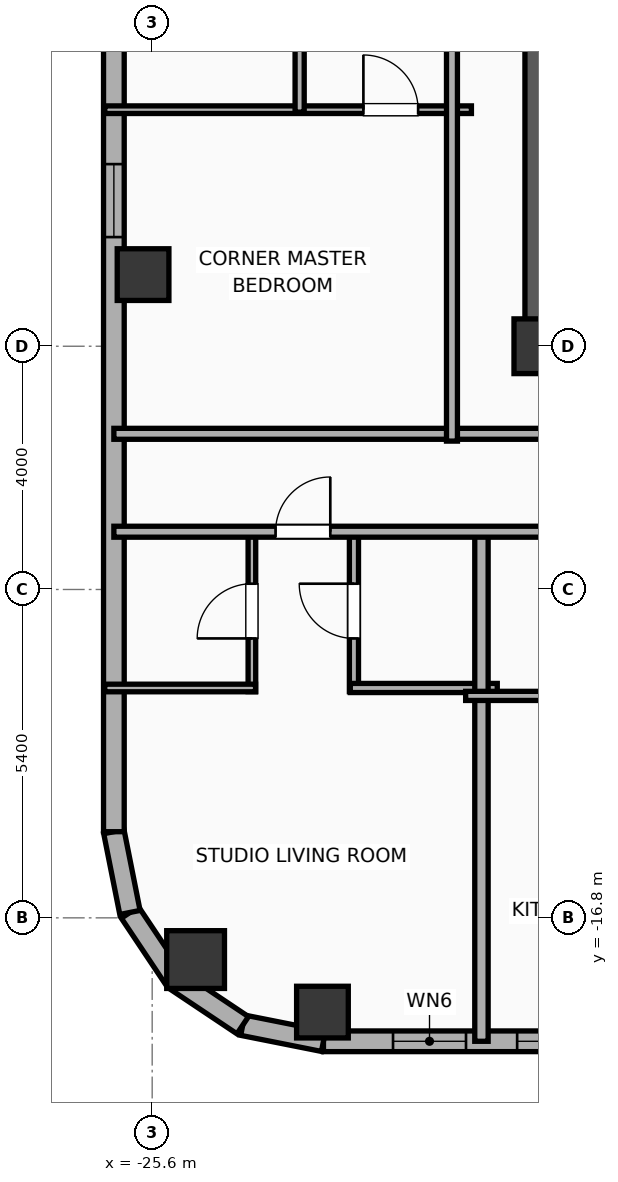
"""IFC4 building model, lengths in metres.
Left out: names, types, materials, properties, quantities, classifications, styles, units other than length and angle.
Written with IfcOpenShell. Run it as: python <this file> out.ifc"""

import sys

from ifc_helpers import new_model, si_unit, direction, frame, frame_2d, origin, origin_2d, place, context, subcontext, project, spatial, rectangle, hollow_rectangle, hollow_circle, extrude, element, fill, save


model = new_model("IFC4")
c1 = context("Model", 3, precision=1e-05, world=origin(), true_north=direction((0.0, 1.0)))
c2 = subcontext(c1, "Body", "Model", "MODEL_VIEW")
j1 = project(units=[si_unit("LENGTHUNIT", "METRE"), si_unit("PLANEANGLEUNIT", "RADIAN")], contexts=[c1])
p1 = place(None, origin())
s1 = spatial("IfcSite", under=j1, at=p1, CompositionType="ELEMENT")
p2 = place(p1, origin())
s2 = spatial("IfcBuilding", under=s1, at=p2, CompositionType="ELEMENT")
p3 = place(p2, frame((0.0, 0.0, 227.5)))
s3 = spatial("IfcBuildingStorey", under=s2, at=p3, CompositionType="ELEMENT", Elevation=227.5)
p4 = place(p3, frame((-19.2, -7.4, 0.0), z_axis=(0.0, 0.0, 1.0), x_axis=(1.0, 0.0, 0.0)))
e1 = element("IfcColumn", 1, at=p4, inside=s3, PredefinedType="COLUMN", context=c2, shape_type="SweptSolid", body=[
    extrude(rectangle(XDim=0.9, YDim=0.9, at=origin_2d()), origin(), (0.0, 0.0, 1.0), 3.9),
])
p5 = place(p3, frame((-19.425, -7.4, 0.0), z_axis=(0.0, 0.0, 1.0), x_axis=(1.0, 0.0, 0.0)))
e2 = element("IfcWall", 2, at=p5, inside=s3, PredefinedType="SHEAR", context=c2, shape_type="SweptSolid", body=[
    extrude(rectangle(XDim=7.25, YDim=0.45, at=frame_2d((3.625, 0.0))), origin(), (0.0, 0.0, 1.0), 3.65),
])
p6 = place(p3, frame((-19.145, -7.4, 0.0), z_axis=(0.0, 0.0, 1.0), x_axis=(0.0, 1.0, 0.0)))
e3 = element("IfcWall", 3, at=p6, inside=s3, PredefinedType="SHEAR", context=c2, shape_type="SweptSolid", body=[
    extrude(rectangle(XDim=14.8, YDim=0.65, at=frame_2d((7.4, 0.0))), origin(), (0.0, 0.0, 1.0), 3.65),
])
for number, where, z_axis, x_axis in (
    (4, (-22.8, -18.35, 0.0), (0.0, 0.0, 1.0), (1.0, 0.0, 0.0)),
    (5, (-25.75, -6.222, 0.0), (0.0, 0.0, 1.0), (1.0, 0.0, 0.0)),
):
    element("IfcColumn", number, at=place(p3, frame(where, z_axis=z_axis, x_axis=x_axis)), inside=s3, PredefinedType="COLUMN", context=c2, shape_type="SweptSolid", body=[
        extrude(hollow_rectangle(XDim=0.85, YDim=0.85, WallThickness=0.028, at=origin_2d()), origin(), (0.0, 0.0, 1.0), 3.9),
    ])
p7 = place(p3, frame((-24.886, -17.486, 0.0), z_axis=(0.0, 0.0, 1.0), x_axis=(1.0, 0.0, 0.0)))
e6 = element("IfcColumn", 6, at=p7, inside=s3, PredefinedType="COLUMN", context=c2, shape_type="SweptSolid", body=[
    extrude(hollow_circle(Radius=0.475, WallThickness=0.032, at=origin_2d()), origin(), (0.0, 0.0, 1.0), 3.9),
])
p8 = place(p3, frame((26.783, -18.83, 0.0), z_axis=(0.0, 0.0, 1.0), x_axis=(-1.0, 0.0, 0.0)))
e7 = element("IfcWall", 7, at=p8, inside=s3, PredefinedType="ELEMENTEDWALL", context=c2, shape_type="SweptSolid", body=[
    extrude(rectangle(XDim=49.566, YDim=0.34, at=frame_2d((24.783, 0.0))), origin(), (0.0, 0.0, 1.0), 3.65),
])
p9 = place(p8, frame((23.583, 0.0, 0.75)))
e8 = element("IfcOpeningElement", 8, at=p9, cuts=e7, PredefinedType="OPENING", context=c2, shape_type="SweptSolid", body=[
    extrude(rectangle(XDim=2.4, YDim=2.1, at=frame_2d((1.2, 1.05))), frame((0.0, 0.18, 0.0), z_axis=(0.0, -1.0, 0.0), x_axis=(1.0, 0.0, 0.0)), (0.0, 0.0, 1.0), 0.36),
])
p10 = place(p8, frame((41.756, 0.0, 0.75)))
e9 = element("IfcOpeningElement", 9, at=p10, cuts=e7, PredefinedType="OPENING", context=c2, shape_type="SweptSolid", body=[
    extrude(rectangle(XDim=2.4, YDim=2.1, at=frame_2d((1.2, 1.05))), frame((0.0, 0.18, 0.0), z_axis=(0.0, -1.0, 0.0), x_axis=(1.0, 0.0, 0.0)), (0.0, 0.0, 1.0), 0.36),
])
p11 = place(p8, frame((47.222, 0.0, 0.75)))
e10 = element("IfcOpeningElement", 10, at=p11, cuts=e7, PredefinedType="OPENING", context=c2, shape_type="SweptSolid", body=[
    extrude(rectangle(XDim=1.2, YDim=2.05, at=frame_2d((0.6, 1.025))), frame((0.0, 0.18, 0.0), z_axis=(0.0, -1.0, 0.0), x_axis=(1.0, 0.0, 0.0)), (0.0, 0.0, 1.0), 0.36),
])
p12 = place(p8, frame((45.181, 0.0, 0.75)))
e11 = element("IfcOpeningElement", 11, at=p12, cuts=e7, PredefinedType="OPENING", context=c2, shape_type="SweptSolid", body=[
    extrude(rectangle(XDim=1.2, YDim=2.05, at=frame_2d((0.6, 1.025))), frame((0.0, 0.18, 0.0), z_axis=(0.0, -1.0, 0.0), x_axis=(1.0, 0.0, 0.0)), (0.0, 0.0, 1.0), 0.36),
])
p13 = place(p8, frame((37.289, 0.0, 0.75)))
e12 = element("IfcOpeningElement", 12, at=p13, cuts=e7, PredefinedType="OPENING", context=c2, shape_type="SweptSolid", body=[
    extrude(rectangle(XDim=1.2, YDim=2.05, at=frame_2d((0.6, 1.025))), frame((0.0, 0.18, 0.0), z_axis=(0.0, -1.0, 0.0), x_axis=(1.0, 0.0, 0.0)), (0.0, 0.0, 1.0), 0.36),
])
p14 = place(p8, frame((16.115, 0.0, 0.75)))
e13 = element("IfcOpeningElement", 13, at=p14, cuts=e7, PredefinedType="OPENING", context=c2, shape_type="SweptSolid", body=[
    extrude(rectangle(XDim=1.2, YDim=2.05, at=frame_2d((0.6, 1.025))), frame((0.0, 0.18, 0.0), z_axis=(0.0, -1.0, 0.0), x_axis=(1.0, 0.0, 0.0)), (0.0, 0.0, 1.0), 0.36),
])
p15 = place(p8, frame((12.422, 0.0, 0.75)))
e14 = element("IfcOpeningElement", 14, at=p15, cuts=e7, PredefinedType="OPENING", context=c2, shape_type="SweptSolid", body=[
    extrude(rectangle(XDim=1.2, YDim=2.05, at=frame_2d((0.6, 1.025))), frame((0.0, 0.18, 0.0), z_axis=(0.0, -1.0, 0.0), x_axis=(1.0, 0.0, 0.0)), (0.0, 0.0, 1.0), 0.36),
])
p16 = place(p8, frame((8.09, 0.0, 0.75)))
e15 = element("IfcOpeningElement", 15, at=p16, cuts=e7, PredefinedType="OPENING", context=c2, shape_type="SweptSolid", body=[
    extrude(rectangle(XDim=1.2, YDim=2.05, at=frame_2d((0.6, 1.025))), frame((0.0, 0.18, 0.0), z_axis=(0.0, -1.0, 0.0), x_axis=(1.0, 0.0, 0.0)), (0.0, 0.0, 1.0), 0.36),
])
p17 = place(p8, frame((4.637, 0.0, 0.75)))
e16 = element("IfcOpeningElement", 16, at=p17, cuts=e7, PredefinedType="OPENING", context=c2, shape_type="SweptSolid", body=[
    extrude(rectangle(XDim=1.2, YDim=2.05, at=frame_2d((0.6, 1.025))), frame((0.0, 0.18, 0.0), z_axis=(0.0, -1.0, 0.0), x_axis=(1.0, 0.0, 0.0)), (0.0, 0.0, 1.0), 0.36),
])
p18 = place(p8, frame((1.811, 0.0, 0.75)))
e17 = element("IfcOpeningElement", 17, at=p18, cuts=e7, PredefinedType="OPENING", context=c2, shape_type="SweptSolid", body=[
    extrude(rectangle(XDim=1.2, YDim=2.05, at=frame_2d((0.6, 1.025))), frame((0.0, 0.18, 0.0), z_axis=(0.0, -1.0, 0.0), x_axis=(1.0, 0.0, 0.0)), (0.0, 0.0, 1.0), 0.36),
])
p19 = place(p8, frame((32.253, 0.0, 0.75)))
e18 = element("IfcOpeningElement", 18, at=p19, cuts=e7, PredefinedType="OPENING", context=c2, shape_type="SweptSolid", body=[
    extrude(rectangle(XDim=1.2, YDim=2.05, at=frame_2d((0.6, 1.025))), frame((0.0, 0.18, 0.0), z_axis=(0.0, -1.0, 0.0), x_axis=(1.0, 0.0, 0.0)), (0.0, 0.0, 1.0), 0.36),
])
p20 = place(p8, frame((27.853, 0.0, 0.75)))
e19 = element("IfcOpeningElement", 19, at=p20, cuts=e7, PredefinedType="OPENING", context=c2, shape_type="SweptSolid", body=[
    extrude(rectangle(XDim=1.2, YDim=2.05, at=frame_2d((0.6, 1.025))), frame((0.0, 0.18, 0.0), z_axis=(0.0, -1.0, 0.0), x_axis=(1.0, 0.0, 0.0)), (0.0, 0.0, 1.0), 0.36),
])
p21 = place(p8, frame((20.473, 0.0, 0.75)))
e20 = element("IfcOpeningElement", 20, at=p21, cuts=e7, PredefinedType="OPENING", context=c2, shape_type="SweptSolid", body=[
    extrude(rectangle(XDim=1.2, YDim=2.05, at=frame_2d((0.6, 1.025))), frame((0.0, 0.18, 0.0), z_axis=(0.0, -1.0, 0.0), x_axis=(1.0, 0.0, 0.0)), (0.0, 0.0, 1.0), 0.36),
])
p22 = place(p3, frame((-22.783, -18.83, 0.0), z_axis=(0.0, 0.0, 1.0), x_axis=(-0.980788153188, 0.195075878998, 0.0)))
e21 = element("IfcWall", 21, at=p22, inside=s3, PredefinedType="ELEMENTEDWALL", context=c2, shape_type="SweptSolid", body=[
    extrude(rectangle(XDim=1.354, YDim=0.34, at=frame_2d((0.677, 0.0))), origin(), (0.0, 0.0, 1.0), 3.65),
])
p23 = place(p3, frame((-24.111, -18.566, 0.0), z_axis=(0.0, 0.0, 1.0), x_axis=(-0.831403586725, 0.555669034571, 0.0)))
e22 = element("IfcWall", 22, at=p23, inside=s3, PredefinedType="ELEMENTEDWALL", context=c2, shape_type="SweptSolid", body=[
    extrude(rectangle(XDim=1.337, YDim=0.34, at=frame_2d((0.668, 0.0))), origin(), (0.0, 0.0, 1.0), 3.65),
])
p24 = place(p3, frame((-25.223, -17.823, 0.0), z_axis=(0.0, 0.0, 1.0), x_axis=(-0.555584683399, 0.831459956686, 0.0)))
e23 = element("IfcWall", 23, at=p24, inside=s3, PredefinedType="ELEMENTEDWALL", context=c2, shape_type="SweptSolid", body=[
    extrude(rectangle(XDim=1.337, YDim=0.34, at=frame_2d((0.668, 0.0))), origin(), (0.0, 0.0, 1.0), 3.65),
])
p25 = place(p3, frame((-25.966, -16.711, 0.0), z_axis=(0.0, 0.0, 1.0), x_axis=(-0.195110379894, 0.98078129043, 0.0)))
e24 = element("IfcWall", 24, at=p25, inside=s3, PredefinedType="ELEMENTEDWALL", context=c2, shape_type="SweptSolid", body=[
    extrude(rectangle(XDim=1.354, YDim=0.34, at=frame_2d((0.677, 0.0))), origin(), (0.0, 0.0, 1.0), 3.65),
])
p26 = place(p3, frame((-26.23, -15.383, 0.0), z_axis=(0.0, 0.0, 1.0), x_axis=(0.0, 1.0, 0.0)))
e25 = element("IfcWall", 25, at=p26, inside=s3, PredefinedType="ELEMENTEDWALL", context=c2, shape_type="SweptSolid", body=[
    extrude(rectangle(XDim=31.967, YDim=0.34, at=frame_2d((15.983, 0.0))), origin(), (0.0, 0.0, 1.0), 3.65),
])
p27 = place(p26, frame((29.431, 0.0, 0.75)))
e26 = element("IfcOpeningElement", 26, at=p27, cuts=e25, PredefinedType="OPENING", context=c2, shape_type="SweptSolid", body=[
    extrude(rectangle(XDim=1.2, YDim=2.05, at=frame_2d((0.6, 1.025))), frame((0.0, 0.18, 0.0), z_axis=(0.0, -1.0, 0.0), x_axis=(1.0, 0.0, 0.0)), (0.0, 0.0, 1.0), 0.36),
])
p28 = place(p26, frame((20.603, 0.0, 0.75)))
e27 = element("IfcOpeningElement", 27, at=p28, cuts=e25, PredefinedType="OPENING", context=c2, shape_type="SweptSolid", body=[
    extrude(rectangle(XDim=1.2, YDim=2.05, at=frame_2d((0.6, 1.025))), frame((0.0, 0.18, 0.0), z_axis=(0.0, -1.0, 0.0), x_axis=(1.0, 0.0, 0.0)), (0.0, 0.0, 1.0), 0.36),
])
p29 = place(p26, frame((9.778, 0.0, 0.75)))
e28 = element("IfcOpeningElement", 28, at=p29, cuts=e25, PredefinedType="OPENING", context=c2, shape_type="SweptSolid", body=[
    extrude(rectangle(XDim=1.2, YDim=2.05, at=frame_2d((0.6, 1.025))), frame((0.0, 0.18, 0.0), z_axis=(0.0, -1.0, 0.0), x_axis=(1.0, 0.0, 0.0)), (0.0, 0.0, 1.0), 0.36),
])
p30 = place(p3, frame((-26.23, -8.84, 0.0), z_axis=(0.0, 0.0, 1.0), x_axis=(1.0, 0.0, 0.0)))
e29 = element("IfcWall", 29, at=p30, inside=s3, PredefinedType="PARTITIONING", context=c2, shape_type="SweptSolid", body=[
    extrude(rectangle(XDim=16.35, YDim=0.18, at=frame_2d((8.175, 0.0))), origin(), (0.0, 0.0, 1.0), 3.65),
])
p31 = place(p3, frame((-23.96, -13.08, 0.0), z_axis=(0.0, 0.0, 1.0), x_axis=(0.0, 1.0, 0.0)))
e30 = element("IfcWall", 30, at=p31, inside=s3, PredefinedType="PARTITIONING", context=c2, shape_type="SweptSolid", body=[
    extrude(rectangle(XDim=2.65, YDim=0.125, at=frame_2d((1.325, 0.0))), origin(), (0.0, 0.0, 1.0), 3.65),
])
p32 = place(p31, frame((0.875, 0.0, 0.0)))
e31 = element("IfcOpeningElement", 31, at=p32, cuts=e30, PredefinedType="OPENING", context=c2, shape_type="SweptSolid", body=[
    extrude(rectangle(XDim=0.9, YDim=2.05, at=frame_2d((0.45, 1.025))), frame((0.0, 0.073, 0.0), z_axis=(0.0, -1.0, 0.0), x_axis=(1.0, 0.0, 0.0)), (0.0, 0.0, 1.0), 0.145),
])
p33 = place(p3, frame((-22.282, -13.08, 0.0), z_axis=(0.0, 0.0, 1.0), x_axis=(0.0, 1.0, 0.0)))
e32 = element("IfcWall", 32, at=p33, inside=s3, PredefinedType="PLUMBINGWALL", context=c2, shape_type="SweptSolid", body=[
    extrude(rectangle(XDim=2.65, YDim=0.15, at=frame_2d((1.325, 0.0))), origin(), (0.0, 0.0, 1.0), 3.65),
])
p34 = place(p33, frame((0.875, 0.0, 0.0)))
e33 = element("IfcOpeningElement", 33, at=p34, cuts=e32, PredefinedType="OPENING", context=c2, shape_type="SweptSolid", body=[
    extrude(rectangle(XDim=0.9, YDim=2.05, at=frame_2d((0.45, 1.025))), frame((0.0, 0.085, 0.0), z_axis=(0.0, -1.0, 0.0), x_axis=(1.0, 0.0, 0.0)), (0.0, 0.0, 1.0), 0.17),
])
p35 = place(p3, frame((-26.38, -13.02, 0.0), z_axis=(0.0, 0.0, 1.0), x_axis=(1.0, 0.0, 0.0)))
e34 = element("IfcWall", 34, at=p35, inside=s3, PredefinedType="PARTITIONING", context=c2, shape_type="SweptSolid", body=[
    extrude(rectangle(XDim=2.48, YDim=0.125, at=frame_2d((1.24, 0.0))), origin(), (0.0, 0.0, 1.0), 3.65),
])
p36 = place(p3, frame((-22.342, -13.02, 0.0), z_axis=(0.0, 0.0, 1.0), x_axis=(1.0, 0.0, 0.0)))
e35 = element("IfcWall", 35, at=p36, inside=s3, PredefinedType="PLUMBINGWALL", context=c2, shape_type="SweptSolid", body=[
    extrude(rectangle(XDim=2.417, YDim=0.15, at=frame_2d((1.208, 0.0))), origin(), (0.0, 0.0, 1.0), 3.65),
])
p37 = place(p3, frame((-20.185, -18.83, 0.0), z_axis=(0.0, 0.0, 1.0), x_axis=(0.0, 1.0, 0.0)))
e36 = element("IfcWall", 36, at=p37, inside=s3, PredefinedType="PARTITIONING", context=c2, shape_type="SweptSolid", body=[
    extrude(rectangle(XDim=8.46, YDim=0.22, at=frame_2d((4.23, 0.0))), origin(), (0.0, 0.0, 1.0), 3.09),
])
p38 = place(p3, frame((-20.445, -13.15, 0.0), z_axis=(0.0, 0.0, 1.0), x_axis=(1.0, 0.0, 0.0)))
e37 = element("IfcWall", 37, at=p38, inside=s3, PredefinedType="PLUMBINGWALL", context=c2, shape_type="SweptSolid", body=[
    extrude(rectangle(XDim=2.714, YDim=0.15, at=frame_2d((1.357, 0.0))), origin(), (0.0, 0.0, 1.0), 3.65),
])
p39 = place(p3, frame((-26.23, -10.45, 0.0), z_axis=(0.0, 0.0, 1.0), x_axis=(1.0, 0.0, 0.0)))
e38 = element("IfcWall", 38, at=p39, inside=s3, PredefinedType="PARTITIONING", context=c2, shape_type="SweptSolid", body=[
    extrude(rectangle(XDim=18.15, YDim=0.18, at=frame_2d((9.075, 0.0))), origin(), (0.0, 0.0, 1.0), 3.65),
])
p40 = place(p39, frame((2.659, 0.0, 0.0)))
e39 = element("IfcOpeningElement", 39, at=p40, cuts=e38, PredefinedType="OPENING", context=c2, shape_type="SweptSolid", body=[
    extrude(rectangle(XDim=0.9, YDim=2.05, at=frame_2d((0.45, 1.025))), frame((0.0, 0.1, 0.0), z_axis=(0.0, -1.0, 0.0), x_axis=(1.0, 0.0, 0.0)), (0.0, 0.0, 1.0), 0.2),
])
p41 = place(p39, frame((9.654, 0.0, 0.0)))
e40 = element("IfcOpeningElement", 40, at=p41, cuts=e38, PredefinedType="OPENING", context=c2, shape_type="SweptSolid", body=[
    extrude(rectangle(XDim=1.15, YDim=2.05, at=frame_2d((0.575, 1.025))), frame((0.0, 0.1, 0.0), z_axis=(0.0, -1.0, 0.0), x_axis=(1.0, 0.0, 0.0)), (0.0, 0.0, 1.0), 0.2),
])
p42 = place(p39, frame((14.792, 0.0, 0.0)))
e41 = element("IfcOpeningElement", 41, at=p42, cuts=e38, PredefinedType="OPENING", context=c2, shape_type="SweptSolid", body=[
    extrude(rectangle(XDim=0.9, YDim=2.05, at=frame_2d((0.45, 1.025))), frame((0.0, 0.1, 0.0), z_axis=(0.0, -1.0, 0.0), x_axis=(1.0, 0.0, 0.0)), (0.0, 0.0, 1.0), 0.2),
])
p43 = place(p3, frame((-26.38, -3.51, 0.0), z_axis=(0.0, 0.0, 1.0), x_axis=(1.0, 0.0, 0.0)))
e42 = element("IfcWall", 42, at=p43, inside=s3, PredefinedType="PARTITIONING", context=c2, shape_type="SweptSolid", body=[
    extrude(rectangle(XDim=6.03, YDim=0.125, at=frame_2d((3.015, 0.0))), origin(), (0.0, 0.0, 1.0), 3.65),
])
p44 = place(p43, frame((4.253, 0.0, 0.0)))
e43 = element("IfcOpeningElement", 43, at=p44, cuts=e42, PredefinedType="OPENING", context=c2, shape_type="SweptSolid", body=[
    extrude(rectangle(XDim=0.9, YDim=2.05, at=frame_2d((0.45, 1.025))), frame((0.0, 0.073, 0.0), z_axis=(0.0, -1.0, 0.0), x_axis=(1.0, 0.0, 0.0)), (0.0, 0.0, 1.0), 0.145),
])
p45 = place(p3, frame((-23.175, -3.55, 0.0), z_axis=(0.0, 0.0, 1.0), x_axis=(0.0, 1.0, 0.0)))
e44 = element("IfcWall", 44, at=p45, inside=s3, PredefinedType="PLUMBINGWALL", context=c2, shape_type="SweptSolid", body=[
    extrude(rectangle(XDim=3.33, YDim=0.15, at=frame_2d((1.665, 0.0))), origin(), (0.0, 0.0, 1.0), 3.65),
])
p46 = place(p45, frame((1.215, 0.0, 0.0)))
e45 = element("IfcOpeningElement", 45, at=p46, cuts=e44, PredefinedType="OPENING", context=c2, shape_type="SweptSolid", body=[
    extrude(rectangle(XDim=0.9, YDim=2.05, at=frame_2d((0.45, 1.025))), frame((0.0, 0.085, 0.0), z_axis=(0.0, -1.0, 0.0), x_axis=(1.0, 0.0, 0.0)), (0.0, 0.0, 1.0), 0.17),
])
p47 = place(p3, frame((-20.67, -8.96, 0.0), z_axis=(0.0, 0.0, 1.0), x_axis=(0.0, 1.0, 0.0)))
e46 = element("IfcWall", 46, at=p47, inside=s3, PredefinedType="PARTITIONING", context=c2, shape_type="SweptSolid", body=[
    extrude(rectangle(XDim=17.92, YDim=0.18, at=frame_2d((8.96, 0.0))), origin(), (0.0, 0.0, 1.0), 3.65),
])
p48 = place(p11, origin())
e47 = element("IfcWindow", 47, at=p48, inside=s3, PartitioningType="SINGLE_PANEL", PredefinedType="WINDOW", context=c2, shape_type="SweptSolid", body=[
    extrude(rectangle(XDim=1.2, YDim=2.05, at=frame_2d((0.6, 1.025))), frame((0.0, 0.03, 0.0), z_axis=(0.0, -1.0, 0.0), x_axis=(1.0, 0.0, 0.0)), (0.0, 0.0, 1.0), 0.06),
])
fill(e10, e47)
p49 = place(p12, origin())
e48 = element("IfcWindow", 48, at=p49, inside=s3, PartitioningType="SINGLE_PANEL", PredefinedType="WINDOW", context=c2, shape_type="SweptSolid", body=[
    extrude(rectangle(XDim=1.2, YDim=2.05, at=frame_2d((0.6, 1.025))), frame((0.0, 0.03, 0.0), z_axis=(0.0, -1.0, 0.0), x_axis=(1.0, 0.0, 0.0)), (0.0, 0.0, 1.0), 0.06),
])
fill(e11, e48)
p50 = place(p29, origin())
e49 = element("IfcWindow", 49, at=p50, inside=s3, PartitioningType="SINGLE_PANEL", PredefinedType="WINDOW", context=c2, shape_type="SweptSolid", body=[
    extrude(rectangle(XDim=1.2, YDim=2.05, at=frame_2d((0.6, 1.025))), frame((0.0, 0.03, 0.0), z_axis=(0.0, -1.0, 0.0), x_axis=(1.0, 0.0, 0.0)), (0.0, 0.0, 1.0), 0.06),
])
fill(e28, e49)
p51 = place(p32, origin())
e50 = element("IfcDoor", 50, at=p51, inside=s3, OperationType="SINGLE_SWING_LEFT", PredefinedType="DOOR", context=c2, shape_type="SweptSolid", body=[
    extrude(rectangle(XDim=0.9, YDim=2.05, at=frame_2d((0.45, 1.025))), frame((0.0, 0.025, 0.0), z_axis=(0.0, -1.0, 0.0), x_axis=(1.0, 0.0, 0.0)), (0.0, 0.0, 1.0), 0.05),
])
fill(e31, e50)
p52 = place(p34, origin())
e51 = element("IfcDoor", 51, at=p52, inside=s3, OperationType="SINGLE_SWING_RIGHT", PredefinedType="DOOR", context=c2, shape_type="SweptSolid", body=[
    extrude(rectangle(XDim=0.9, YDim=2.05, at=frame_2d((0.45, 1.025))), frame((0.0, 0.025, 0.0), z_axis=(0.0, -1.0, 0.0), x_axis=(1.0, 0.0, 0.0)), (0.0, 0.0, 1.0), 0.05),
])
fill(e33, e51)
p53 = place(p40, origin())
e52 = element("IfcDoor", 52, at=p53, inside=s3, OperationType="SINGLE_SWING_RIGHT", PredefinedType="DOOR", context=c2, shape_type="SweptSolid", body=[
    extrude(rectangle(XDim=0.9, YDim=2.05, at=frame_2d((0.45, 1.025))), frame((0.0, 0.025, 0.0), z_axis=(0.0, -1.0, 0.0), x_axis=(1.0, 0.0, 0.0)), (0.0, 0.0, 1.0), 0.05),
])
fill(e39, e52)
p54 = place(p44, origin())
e53 = element("IfcDoor", 53, at=p54, inside=s3, OperationType="SINGLE_SWING_LEFT", PredefinedType="DOOR", context=c2, shape_type="SweptSolid", body=[
    extrude(rectangle(XDim=0.9, YDim=2.05, at=frame_2d((0.45, 1.025))), frame((0.0, 0.025, 0.0), z_axis=(0.0, -1.0, 0.0), x_axis=(1.0, 0.0, 0.0)), (0.0, 0.0, 1.0), 0.05),
])
fill(e43, e53)
save(model, sys.argv[1])
